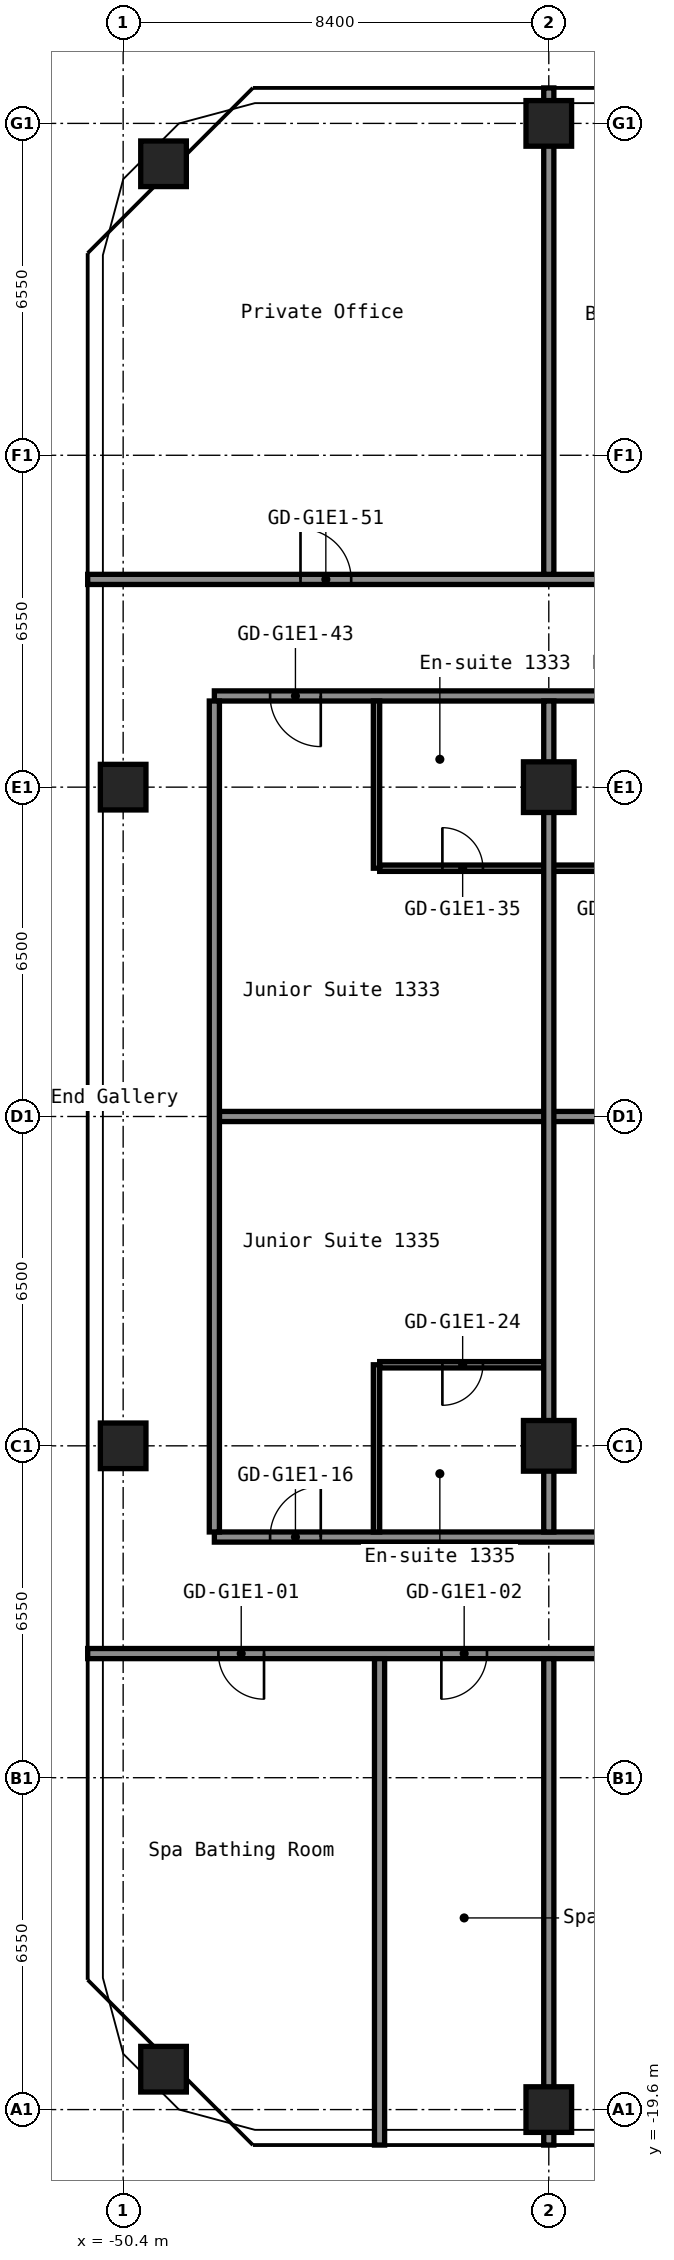
"""IFC4 building model, lengths in metres.
Left out: names, types, materials, properties, quantities, classifications, styles, units other than length and angle.
Written with IfcOpenShell. Run it as: python <this file> out.ifc"""

import sys

from ifc_helpers import new_model, si_unit, direction, frame, frame_2d, origin, origin_2d, place, context, subcontext, project, spatial, rectangle, hollow_rectangle, extrude, element, fill, save


model = new_model("IFC4")
c1 = context("Model", 3, precision=1e-05, world=origin(), true_north=direction((0.0, 1.0)))
c2 = subcontext(c1, "Body", "Model", "MODEL_VIEW")
j1 = project(units=[si_unit("LENGTHUNIT", "METRE"), si_unit("PLANEANGLEUNIT", "RADIAN")], contexts=[c1])
p1 = place(None, origin())
s1 = spatial("IfcSite", under=j1, at=p1, CompositionType="ELEMENT")
p2 = place(p1, origin())
s2 = spatial("IfcBuilding", under=s1, at=p2, CompositionType="ELEMENT")
p3 = place(p2, frame((0.0, 0.0, 48.6)))
s3 = spatial("IfcBuildingStorey", under=s2, at=p3, CompositionType="ELEMENT", Elevation=48.6)
for number, where, z_axis, x_axis in (
    (1, (-49.603, -18.803, 0.0), (0.0, 0.0, 1.0), (1.0, 0.0, 0.0)),
    (2, (-50.4, -6.5, 0.0), (0.0, 0.0, 1.0), (1.0, 0.0, 0.0)),
    (3, (-50.4, 6.5, 0.0), (0.0, 0.0, 1.0), (1.0, 0.0, 0.0)),
    (4, (-49.603, 18.803, 0.0), (0.0, 0.0, 1.0), (1.0, 0.0, 0.0)),
    (5, (-42.0, -19.6, 0.0), (0.0, 0.0, 1.0), (1.0, 0.0, 0.0)),
):
    element("IfcColumn", number, at=place(p3, frame(where, z_axis=z_axis, x_axis=x_axis)), inside=s3, PredefinedType="COLUMN", context=c2, shape_type="SweptSolid", body=[
        extrude(hollow_rectangle(XDim=0.9, YDim=0.9, WallThickness=0.036, at=origin_2d()), origin(), (0.0, 0.0, 1.0), 2.8),
    ])
for number, where, z_axis, x_axis in (
    (6, (-42.0, -6.5, 0.0), (0.0, 0.0, 1.0), (1.0, 0.0, 0.0)),
    (7, (-42.0, 6.5, 0.0), (0.0, 0.0, 1.0), (1.0, 0.0, 0.0)),
):
    element("IfcColumn", number, at=place(p3, frame(where, z_axis=z_axis, x_axis=x_axis)), inside=s3, PredefinedType="COLUMN", context=c2, shape_type="SweptSolid", body=[
        extrude(hollow_rectangle(XDim=1.0, YDim=1.0, WallThickness=0.04, at=origin_2d()), origin(), (0.0, 0.0, 1.0), 2.8),
    ])
p4 = place(p3, frame((-42.0, 19.6, 0.0), z_axis=(0.0, 0.0, 1.0), x_axis=(1.0, 0.0, 0.0)))
e8 = element("IfcColumn", 8, at=p4, inside=s3, PredefinedType="COLUMN", context=c2, shape_type="SweptSolid", body=[
    extrude(hollow_rectangle(XDim=0.9, YDim=0.9, WallThickness=0.036, at=origin_2d()), origin(), (0.0, 0.0, 1.0), 2.8),
])
p5 = place(p3, frame((-51.1, -10.6, 0.0), z_axis=(0.0, 0.0, 1.0), x_axis=(1.0, 0.0, 0.0)))
e9 = element("IfcWall", 9, at=p5, inside=s3, PredefinedType="PARTITIONING", context=c2, shape_type="SweptSolid", body=[
    extrude(rectangle(XDim=34.3, YDim=0.2, at=frame_2d((17.15, 0.0))), origin(), (0.0, 0.0, 1.0), 2.8),
])
p6 = place(p5, frame((2.58, 0.0, 0.0)))
e10 = element("IfcOpeningElement", 10, at=p6, cuts=e9, PredefinedType="OPENING", context=c2, shape_type="SweptSolid", body=[
    extrude(rectangle(XDim=0.9, YDim=2.1, at=frame_2d((0.45, 1.05))), frame((0.0, 0.11, 0.0), z_axis=(0.0, -1.0, 0.0), x_axis=(1.0, 0.0, 0.0)), (0.0, 0.0, 1.0), 0.22),
])
p7 = place(p5, frame((6.98, 0.0, 0.0)))
e11 = element("IfcOpeningElement", 11, at=p7, cuts=e9, PredefinedType="OPENING", context=c2, shape_type="SweptSolid", body=[
    extrude(rectangle(XDim=0.9, YDim=2.1, at=frame_2d((0.45, 1.05))), frame((0.0, 0.11, 0.0), z_axis=(0.0, -1.0, 0.0), x_axis=(1.0, 0.0, 0.0)), (0.0, 0.0, 1.0), 0.22),
])
p8 = place(p5, frame((12.8, 0.0, 0.0)))
e12 = element("IfcOpeningElement", 12, at=p8, cuts=e9, PredefinedType="OPENING", context=c2, shape_type="SweptSolid", body=[
    extrude(rectangle(XDim=1.0, YDim=2.1, at=frame_2d((0.5, 1.05))), frame((0.0, 0.11, 0.0), z_axis=(0.0, -1.0, 0.0), x_axis=(1.0, 0.0, 0.0)), (0.0, 0.0, 1.0), 0.22),
])
p9 = place(p5, frame((19.4, 0.0, 0.0)))
e13 = element("IfcOpeningElement", 13, at=p9, cuts=e9, PredefinedType="OPENING", context=c2, shape_type="SweptSolid", body=[
    extrude(rectangle(XDim=0.9, YDim=2.1, at=frame_2d((0.45, 1.05))), frame((0.0, 0.11, 0.0), z_axis=(0.0, -1.0, 0.0), x_axis=(1.0, 0.0, 0.0)), (0.0, 0.0, 1.0), 0.22),
])
p10 = place(p5, frame((23.6, 0.0, 0.0)))
e14 = element("IfcOpeningElement", 14, at=p10, cuts=e9, PredefinedType="OPENING", context=c2, shape_type="SweptSolid", body=[
    extrude(rectangle(XDim=0.9, YDim=2.1, at=frame_2d((0.45, 1.05))), frame((0.0, 0.11, 0.0), z_axis=(0.0, -1.0, 0.0), x_axis=(1.0, 0.0, 0.0)), (0.0, 0.0, 1.0), 0.22),
])
p11 = place(p5, frame((27.3, 0.0, 0.0)))
e15 = element("IfcOpeningElement", 15, at=p11, cuts=e9, PredefinedType="OPENING", context=c2, shape_type="SweptSolid", body=[
    extrude(rectangle(XDim=0.9, YDim=2.1, at=frame_2d((0.45, 1.05))), frame((0.0, 0.11, 0.0), z_axis=(0.0, -1.0, 0.0), x_axis=(1.0, 0.0, 0.0)), (0.0, 0.0, 1.0), 0.22),
])
p12 = place(p5, frame((31.5, 0.0, 0.0)))
e16 = element("IfcOpeningElement", 16, at=p12, cuts=e9, PredefinedType="OPENING", context=c2, shape_type="SweptSolid", body=[
    extrude(rectangle(XDim=0.9, YDim=2.1, at=frame_2d((0.45, 1.05))), frame((0.0, 0.11, 0.0), z_axis=(0.0, -1.0, 0.0), x_axis=(1.0, 0.0, 0.0)), (0.0, 0.0, 1.0), 0.22),
])
p13 = place(p3, frame((-48.6, -8.3, 0.0), z_axis=(0.0, 0.0, 1.0), x_axis=(1.0, 0.0, 0.0)))
e17 = element("IfcWall", 17, at=p13, inside=s3, PredefinedType="PARTITIONING", context=c2, shape_type="SweptSolid", body=[
    extrude(rectangle(XDim=15.0, YDim=0.2, at=frame_2d((7.5, 0.0))), origin(), (0.0, 0.0, 1.0), 2.8),
])
p14 = place(p13, frame((1.1, 0.0, 0.0)))
e18 = element("IfcOpeningElement", 18, at=p14, cuts=e17, PredefinedType="OPENING", context=c2, shape_type="SweptSolid", body=[
    extrude(rectangle(XDim=1.0, YDim=2.1, at=frame_2d((0.5, 1.05))), frame((0.0, 0.11, 0.0), z_axis=(0.0, -1.0, 0.0), x_axis=(1.0, 0.0, 0.0)), (0.0, 0.0, 1.0), 0.22),
])
p15 = place(p13, frame((8.6, 0.0, 0.0)))
e19 = element("IfcOpeningElement", 19, at=p15, cuts=e17, PredefinedType="OPENING", context=c2, shape_type="SweptSolid", body=[
    extrude(rectangle(XDim=1.0, YDim=2.1, at=frame_2d((0.5, 1.05))), frame((0.0, 0.11, 0.0), z_axis=(0.0, -1.0, 0.0), x_axis=(1.0, 0.0, 0.0)), (0.0, 0.0, 1.0), 0.22),
])
p16 = place(p3, frame((-45.337, -4.9, 0.0), z_axis=(0.0, 0.0, 1.0), x_axis=(1.0, 0.0, 0.0)))
e20 = element("IfcWall", 20, at=p16, inside=s3, PredefinedType="PARTITIONING", context=c2, shape_type="SweptSolid", body=[
    extrude(rectangle(XDim=3.237, YDim=0.125, at=frame_2d((1.619, 0.0))), origin(), (0.0, 0.0, 1.0), 2.8),
])
p17 = place(p16, frame((1.238, 0.0, 0.0)))
e21 = element("IfcOpeningElement", 21, at=p17, cuts=e20, PredefinedType="OPENING", context=c2, shape_type="SweptSolid", body=[
    extrude(rectangle(XDim=0.8, YDim=2.1, at=frame_2d((0.4, 1.05))), frame((0.0, 0.073, 0.0), z_axis=(0.0, -1.0, 0.0), x_axis=(1.0, 0.0, 0.0)), (0.0, 0.0, 1.0), 0.145),
])
p18 = place(p3, frame((-48.5, 0.0, 0.0), z_axis=(0.0, 0.0, 1.0), x_axis=(1.0, 0.0, 0.0)))
e22 = element("IfcWall", 22, at=p18, inside=s3, PredefinedType="PARTITIONING", context=c2, shape_type="SweptSolid", body=[
    extrude(rectangle(XDim=14.9, YDim=0.2, at=frame_2d((7.45, 0.0))), origin(), (0.0, 0.0, 1.0), 2.8),
])
p19 = place(p3, frame((-45.337, 4.9, 0.0), z_axis=(0.0, 0.0, 1.0), x_axis=(1.0, 0.0, 0.0)))
e23 = element("IfcWall", 23, at=p19, inside=s3, PredefinedType="PARTITIONING", context=c2, shape_type="SweptSolid", body=[
    extrude(rectangle(XDim=6.675, YDim=0.125, at=frame_2d((3.337, 0.0))), origin(), (0.0, 0.0, 1.0), 2.8),
])
p20 = place(p19, frame((1.238, 0.0, 0.0)))
e24 = element("IfcOpeningElement", 24, at=p20, cuts=e23, PredefinedType="OPENING", context=c2, shape_type="SweptSolid", body=[
    extrude(rectangle(XDim=0.8, YDim=2.1, at=frame_2d((0.4, 1.05))), frame((0.0, 0.073, 0.0), z_axis=(0.0, -1.0, 0.0), x_axis=(1.0, 0.0, 0.0)), (0.0, 0.0, 1.0), 0.145),
])
p21 = place(p19, frame((4.637, 0.0, 0.0)))
e25 = element("IfcOpeningElement", 25, at=p21, cuts=e23, PredefinedType="OPENING", context=c2, shape_type="SweptSolid", body=[
    extrude(rectangle(XDim=0.8, YDim=2.1, at=frame_2d((0.4, 1.05))), frame((0.0, 0.073, 0.0), z_axis=(0.0, -1.0, 0.0), x_axis=(1.0, 0.0, 0.0)), (0.0, 0.0, 1.0), 0.145),
])
p22 = place(p3, frame((-48.6, 8.3, 0.0), z_axis=(0.0, 0.0, 1.0), x_axis=(1.0, 0.0, 0.0)))
e26 = element("IfcWall", 26, at=p22, inside=s3, PredefinedType="PARTITIONING", context=c2, shape_type="SweptSolid", body=[
    extrude(rectangle(XDim=15.0, YDim=0.2, at=frame_2d((7.5, 0.0))), origin(), (0.0, 0.0, 1.0), 2.8),
])
p23 = place(p22, frame((1.1, 0.0, 0.0)))
e27 = element("IfcOpeningElement", 27, at=p23, cuts=e26, PredefinedType="OPENING", context=c2, shape_type="SweptSolid", body=[
    extrude(rectangle(XDim=1.0, YDim=2.1, at=frame_2d((0.5, 1.05))), frame((0.0, 0.11, 0.0), z_axis=(0.0, -1.0, 0.0), x_axis=(1.0, 0.0, 0.0)), (0.0, 0.0, 1.0), 0.22),
])
p24 = place(p22, frame((12.0, 0.0, 0.0)))
e28 = element("IfcOpeningElement", 28, at=p24, cuts=e26, PredefinedType="OPENING", context=c2, shape_type="SweptSolid", body=[
    extrude(rectangle(XDim=1.0, YDim=2.1, at=frame_2d((0.5, 1.05))), frame((0.0, 0.11, 0.0), z_axis=(0.0, -1.0, 0.0), x_axis=(1.0, 0.0, 0.0)), (0.0, 0.0, 1.0), 0.22),
])
p25 = place(p3, frame((-51.1, 10.6, 0.0), z_axis=(0.0, 0.0, 1.0), x_axis=(1.0, 0.0, 0.0)))
e29 = element("IfcWall", 29, at=p25, inside=s3, PredefinedType="PARTITIONING", context=c2, shape_type="SweptSolid", body=[
    extrude(rectangle(XDim=34.3, YDim=0.2, at=frame_2d((17.15, 0.0))), origin(), (0.0, 0.0, 1.0), 2.8),
])
p26 = place(p25, frame((4.2, 0.0, 0.0)))
e30 = element("IfcOpeningElement", 30, at=p26, cuts=e29, PredefinedType="OPENING", context=c2, shape_type="SweptSolid", body=[
    extrude(rectangle(XDim=1.0, YDim=2.1, at=frame_2d((0.5, 1.05))), frame((0.0, 0.11, 0.0), z_axis=(0.0, -1.0, 0.0), x_axis=(1.0, 0.0, 0.0)), (0.0, 0.0, 1.0), 0.22),
])
p27 = place(p25, frame((11.085, 0.0, 0.0)))
e31 = element("IfcOpeningElement", 31, at=p27, cuts=e29, PredefinedType="OPENING", context=c2, shape_type="SweptSolid", body=[
    extrude(rectangle(XDim=0.9, YDim=2.1, at=frame_2d((0.45, 1.05))), frame((0.0, 0.11, 0.0), z_axis=(0.0, -1.0, 0.0), x_axis=(1.0, 0.0, 0.0)), (0.0, 0.0, 1.0), 0.22),
])
p28 = place(p25, frame((15.285, 0.0, 0.0)))
e32 = element("IfcOpeningElement", 32, at=p28, cuts=e29, PredefinedType="OPENING", context=c2, shape_type="SweptSolid", body=[
    extrude(rectangle(XDim=0.9, YDim=2.1, at=frame_2d((0.45, 1.05))), frame((0.0, 0.11, 0.0), z_axis=(0.0, -1.0, 0.0), x_axis=(1.0, 0.0, 0.0)), (0.0, 0.0, 1.0), 0.22),
])
p29 = place(p25, frame((18.98, 0.0, 0.0)))
e33 = element("IfcOpeningElement", 33, at=p29, cuts=e29, PredefinedType="OPENING", context=c2, shape_type="SweptSolid", body=[
    extrude(rectangle(XDim=0.9, YDim=2.1, at=frame_2d((0.45, 1.05))), frame((0.0, 0.11, 0.0), z_axis=(0.0, -1.0, 0.0), x_axis=(1.0, 0.0, 0.0)), (0.0, 0.0, 1.0), 0.22),
])
p30 = place(p25, frame((23.18, 0.0, 0.0)))
e34 = element("IfcOpeningElement", 34, at=p30, cuts=e29, PredefinedType="OPENING", context=c2, shape_type="SweptSolid", body=[
    extrude(rectangle(XDim=0.9, YDim=2.1, at=frame_2d((0.45, 1.05))), frame((0.0, 0.11, 0.0), z_axis=(0.0, -1.0, 0.0), x_axis=(1.0, 0.0, 0.0)), (0.0, 0.0, 1.0), 0.22),
])
p31 = place(p25, frame((29.6, 0.0, 0.0)))
e35 = element("IfcOpeningElement", 35, at=p31, cuts=e29, PredefinedType="OPENING", context=c2, shape_type="SweptSolid", body=[
    extrude(rectangle(XDim=1.0, YDim=2.1, at=frame_2d((0.5, 1.05))), frame((0.0, 0.11, 0.0), z_axis=(0.0, -1.0, 0.0), x_axis=(1.0, 0.0, 0.0)), (0.0, 0.0, 1.0), 0.22),
])
p32 = place(p3, frame((-48.6, -8.2, 0.0), z_axis=(0.0, 0.0, 1.0), x_axis=(0.0, 1.0, 0.0)))
e36 = element("IfcWall", 36, at=p32, inside=s3, PredefinedType="PARTITIONING", context=c2, shape_type="SweptSolid", body=[
    extrude(rectangle(XDim=16.4, YDim=0.2, at=frame_2d((8.2, 0.0))), origin(), (0.0, 0.0, 1.0), 2.8),
])
for number, where, z_axis, x_axis in (
    (37, (-45.4, -8.2, 0.0), (0.0, 0.0, 1.0), (0.0, 1.0, 0.0)),
    (38, (-45.4, 4.9, 0.0), (0.0, 0.0, 1.0), (0.0, 1.0, 0.0)),
):
    element("IfcWall", number, at=place(p3, frame(where, z_axis=z_axis, x_axis=x_axis)), inside=s3, PredefinedType="PARTITIONING", context=c2, shape_type="SweptSolid", body=[
        extrude(rectangle(XDim=3.3, YDim=0.125, at=frame_2d((1.65, 0.0))), origin(), (0.0, 0.0, 1.0), 2.8),
    ])
for number, where, z_axis, x_axis in (
    (39, (-45.34, -20.3, 0.0), (0.0, 0.0, 1.0), (0.0, 1.0, 0.0)),
    (40, (-42.0, -20.3, 0.0), (0.0, 0.0, 1.0), (0.0, 1.0, 0.0)),
):
    element("IfcWall", number, at=place(p3, frame(where, z_axis=z_axis, x_axis=x_axis)), inside=s3, PredefinedType="PARTITIONING", context=c2, shape_type="SweptSolid", body=[
        extrude(rectangle(XDim=9.6, YDim=0.2, at=frame_2d((4.8, 0.0))), origin(), (0.0, 0.0, 1.0), 2.8),
    ])
p33 = place(p3, frame((-42.0, -8.2, 0.0), z_axis=(0.0, 0.0, 1.0), x_axis=(0.0, 1.0, 0.0)))
e41 = element("IfcWall", 41, at=p33, inside=s3, PredefinedType="PARTITIONING", context=c2, shape_type="SweptSolid", body=[
    extrude(rectangle(XDim=16.4, YDim=0.2, at=frame_2d((8.2, 0.0))), origin(), (0.0, 0.0, 1.0), 2.8),
])
p34 = place(p3, frame((-42.0, 10.7, 0.0), z_axis=(0.0, 0.0, 1.0), x_axis=(0.0, 1.0, 0.0)))
e42 = element("IfcWall", 42, at=p34, inside=s3, PredefinedType="PARTITIONING", context=c2, shape_type="SweptSolid", body=[
    extrude(rectangle(XDim=9.6, YDim=0.2, at=frame_2d((4.8, 0.0))), origin(), (0.0, 0.0, 1.0), 2.8),
])
p35 = place(p6, origin())
e43 = element("IfcDoor", 43, at=p35, inside=s3, OperationType="SINGLE_SWING_RIGHT", PredefinedType="DOOR", context=c2, shape_type="SweptSolid", body=[
    extrude(rectangle(XDim=0.9, YDim=2.1, at=frame_2d((0.45, 1.05))), frame((0.0, 0.025, 0.0), z_axis=(0.0, -1.0, 0.0), x_axis=(1.0, 0.0, 0.0)), (0.0, 0.0, 1.0), 0.05),
])
fill(e10, e43)
p36 = place(p7, origin())
e44 = element("IfcDoor", 44, at=p36, inside=s3, OperationType="SINGLE_SWING_LEFT", PredefinedType="DOOR", context=c2, shape_type="SweptSolid", body=[
    extrude(rectangle(XDim=0.9, YDim=2.1, at=frame_2d((0.45, 1.05))), frame((0.0, 0.025, 0.0), z_axis=(0.0, -1.0, 0.0), x_axis=(1.0, 0.0, 0.0)), (0.0, 0.0, 1.0), 0.05),
])
fill(e11, e44)
p37 = place(p14, origin())
e45 = element("IfcDoor", 45, at=p37, inside=s3, OperationType="SINGLE_SWING_LEFT", PredefinedType="DOOR", context=c2, shape_type="SweptSolid", body=[
    extrude(rectangle(XDim=1.0, YDim=2.1, at=frame_2d((0.5, 1.05))), frame((0.0, 0.025, 0.0), z_axis=(0.0, -1.0, 0.0), x_axis=(1.0, 0.0, 0.0)), (0.0, 0.0, 1.0), 0.05),
])
fill(e18, e45)
p38 = place(p17, origin())
e46 = element("IfcDoor", 46, at=p38, inside=s3, OperationType="SINGLE_SWING_LEFT", PredefinedType="DOOR", context=c2, shape_type="SweptSolid", body=[
    extrude(rectangle(XDim=0.8, YDim=2.1, at=frame_2d((0.4, 1.05))), frame((0.0, 0.025, 0.0), z_axis=(0.0, -1.0, 0.0), x_axis=(1.0, 0.0, 0.0)), (0.0, 0.0, 1.0), 0.05),
])
fill(e21, e46)
p39 = place(p20, origin())
e47 = element("IfcDoor", 47, at=p39, inside=s3, OperationType="SINGLE_SWING_RIGHT", PredefinedType="DOOR", context=c2, shape_type="SweptSolid", body=[
    extrude(rectangle(XDim=0.8, YDim=2.1, at=frame_2d((0.4, 1.05))), frame((0.0, 0.025, 0.0), z_axis=(0.0, -1.0, 0.0), x_axis=(1.0, 0.0, 0.0)), (0.0, 0.0, 1.0), 0.05),
])
fill(e24, e47)
p40 = place(p23, origin())
e48 = element("IfcDoor", 48, at=p40, inside=s3, OperationType="SINGLE_SWING_RIGHT", PredefinedType="DOOR", context=c2, shape_type="SweptSolid", body=[
    extrude(rectangle(XDim=1.0, YDim=2.1, at=frame_2d((0.5, 1.05))), frame((0.0, 0.025, 0.0), z_axis=(0.0, -1.0, 0.0), x_axis=(1.0, 0.0, 0.0)), (0.0, 0.0, 1.0), 0.05),
])
fill(e27, e48)
p41 = place(p26, origin())
e49 = element("IfcDoor", 49, at=p41, inside=s3, OperationType="SINGLE_SWING_RIGHT", PredefinedType="DOOR", context=c2, shape_type="SweptSolid", body=[
    extrude(rectangle(XDim=1.0, YDim=2.1, at=frame_2d((0.5, 1.05))), frame((0.0, 0.025, 0.0), z_axis=(0.0, -1.0, 0.0), x_axis=(1.0, 0.0, 0.0)), (0.0, 0.0, 1.0), 0.05),
])
fill(e30, e49)
save(model, sys.argv[1])
